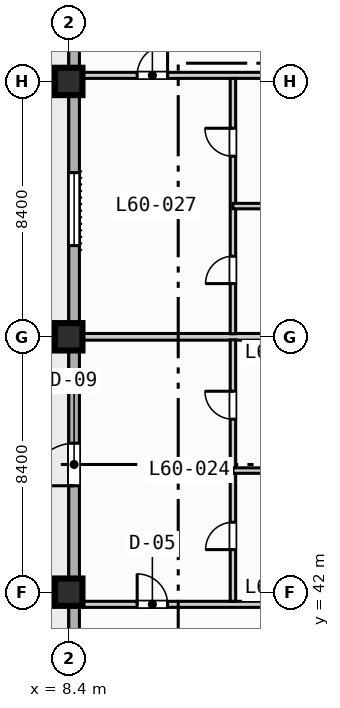
"""IFC4 building model, lengths in metres.
Left out: names, types, materials, properties, quantities, classifications, styles, units other than length and angle.
Written with IfcOpenShell. Run it as: python <this file> out.ifc"""

import sys

from ifc_helpers import new_model, si_unit, direction, frame, frame_2d, origin, origin_2d, place, context, subcontext, project, spatial, rectangle, extrude, element, fill, save


model = new_model("IFC4")
c1 = context("Model", 3, precision=1e-05, world=origin(), true_north=direction((0.0, 1.0)))
c2 = subcontext(c1, "Body", "Model", "MODEL_VIEW")
j1 = project(units=[si_unit("LENGTHUNIT", "METRE"), si_unit("PLANEANGLEUNIT", "RADIAN")], contexts=[c1])
p1 = place(None, origin())
s1 = spatial("IfcSite", under=j1, at=p1, CompositionType="ELEMENT")
p2 = place(p1, origin())
s2 = spatial("IfcBuilding", under=s1, at=p2, CompositionType="ELEMENT")
p3 = place(p2, frame((0.0, 0.0, 245.3)))
s3 = spatial("IfcBuildingStorey", under=s2, at=p3, CompositionType="ELEMENT", Elevation=245.3)
for number, where, z_axis, x_axis in (
    (1, (8.4, 42.0, 0.0), (0.0, 0.0, 1.0), (1.0, 0.0, 0.0)),
    (2, (8.4, 50.4, 0.0), (0.0, 0.0, 1.0), (1.0, 0.0, 0.0)),
    (3, (8.4, 58.8, 0.0), (0.0, 0.0, 1.0), (1.0, 0.0, 0.0)),
):
    element("IfcColumn", number, at=place(p3, frame(where, z_axis=z_axis, x_axis=x_axis)), inside=s3, PredefinedType="COLUMN", context=c2, shape_type="SweptSolid", body=[
        extrude(rectangle(XDim=0.9, YDim=0.9, at=origin_2d()), origin(), (0.0, 0.0, 1.0), 3.7),
    ])
p4 = place(p3, frame((8.575, 11.575, 0.0), z_axis=(0.0, 0.0, 1.0), x_axis=(0.0, 1.0, 0.0)))
e4 = element("IfcWall", 4, at=p4, inside=s3, PredefinedType="STANDARD", context=c2, shape_type="SweptSolid", body=[
    extrude(rectangle(XDim=60.85, YDim=0.35, at=frame_2d((30.425, 0.0))), origin(), (0.0, 0.0, 1.0), 3.47),
])
p5 = place(p4, frame((33.925, 0.0, 0.0)))
e5 = element("IfcOpeningElement", 5, at=p5, cuts=e4, PredefinedType="OPENING", context=c2, shape_type="SweptSolid", body=[
    extrude(rectangle(XDim=1.4, YDim=2.2, at=frame_2d((0.7, 1.1))), frame((0.0, 0.185, 0.0), z_axis=(0.0, -1.0, 0.0), x_axis=(1.0, 0.0, 0.0)), (0.0, 0.0, 1.0), 0.37),
])
p6 = place(p4, frame((25.025, 0.0, 0.85)))
e6 = element("IfcOpeningElement", 6, at=p6, cuts=e4, PredefinedType="OPENING", context=c2, shape_type="SweptSolid", body=[
    extrude(rectangle(XDim=2.4, YDim=1.95, at=frame_2d((1.2, 0.975))), frame((0.0, 0.185, 0.0), z_axis=(0.0, -1.0, 0.0), x_axis=(1.0, 0.0, 0.0)), (0.0, 0.0, 1.0), 0.37),
])
p7 = place(p4, frame((41.825, 0.0, 0.85)))
e7 = element("IfcOpeningElement", 7, at=p7, cuts=e4, PredefinedType="OPENING", context=c2, shape_type="SweptSolid", body=[
    extrude(rectangle(XDim=2.4, YDim=1.95, at=frame_2d((1.2, 0.975))), frame((0.0, 0.185, 0.0), z_axis=(0.0, -1.0, 0.0), x_axis=(1.0, 0.0, 0.0)), (0.0, 0.0, 1.0), 0.37),
])
p8 = place(p4, frame((19.25, 0.0, 0.85)))
e8 = element("IfcOpeningElement", 8, at=p8, cuts=e4, PredefinedType="OPENING", context=c2, shape_type="SweptSolid", body=[
    extrude(rectangle(XDim=1.8, YDim=1.8, at=frame_2d((0.9, 0.9))), frame((0.0, 0.185, 0.0), z_axis=(0.0, -1.0, 0.0), x_axis=(1.0, 0.0, 0.0)), (0.0, 0.0, 1.0), 0.37),
])
p9 = place(p3, frame((8.65, 41.6, 0.0), z_axis=(0.0, 0.0, 1.0), x_axis=(1.0, 0.0, 0.0)))
e9 = element("IfcWall", 9, at=p9, inside=s3, PredefinedType="PARTITIONING", context=c2, shape_type="SweptSolid", body=[
    extrude(rectangle(XDim=7.95, YDim=0.2, at=frame_2d((3.975, 0.0))), origin(), (0.0, 0.0, 1.0), 3.47),
])
p10 = place(p9, frame((2.0, 0.0, 0.0)))
e10 = element("IfcOpeningElement", 10, at=p10, cuts=e9, PredefinedType="OPENING", context=c2, shape_type="SweptSolid", body=[
    extrude(rectangle(XDim=1.0, YDim=2.15, at=frame_2d((0.5, 1.075))), frame((0.0, 0.11, 0.0), z_axis=(0.0, -1.0, 0.0), x_axis=(1.0, 0.0, 0.0)), (0.0, 0.0, 1.0), 0.22),
])
p11 = place(p3, frame((8.65, 59.0, 0.0), z_axis=(0.0, 0.0, 1.0), x_axis=(1.0, 0.0, 0.0)))
e11 = element("IfcWall", 11, at=p11, inside=s3, PredefinedType="PARTITIONING", context=c2, shape_type="SweptSolid", body=[
    extrude(rectangle(XDim=7.95, YDim=0.2, at=frame_2d((3.975, 0.0))), origin(), (0.0, 0.0, 1.0), 2.82),
])
p12 = place(p11, frame((2.0, 0.0, 0.0)))
e12 = element("IfcOpeningElement", 12, at=p12, cuts=e11, PredefinedType="OPENING", context=c2, shape_type="SweptSolid", body=[
    extrude(rectangle(XDim=1.0, YDim=2.15, at=frame_2d((0.5, 1.075))), frame((0.0, 0.11, 0.0), z_axis=(0.0, -1.0, 0.0), x_axis=(1.0, 0.0, 0.0)), (0.0, 0.0, 1.0), 0.22),
])
p13 = place(p3, frame((8.65, 50.4, 0.0), z_axis=(0.0, 0.0, 1.0), x_axis=(1.0, 0.0, 0.0)))
e13 = element("IfcWall", 13, at=p13, inside=s3, PredefinedType="PARTITIONING", context=c2, shape_type="SweptSolid", body=[
    extrude(rectangle(XDim=7.95, YDim=0.22, at=frame_2d((3.975, 0.0))), origin(), (0.0, 0.0, 1.0), 2.859),
])
p14 = place(p3, frame((13.8, 41.7, 0.0), z_axis=(0.0, 0.0, 1.0), x_axis=(0.0, 1.0, 0.0)))
e14 = element("IfcWall", 14, at=p14, inside=s3, PredefinedType="PLUMBINGWALL", context=c2, shape_type="SweptSolid", body=[
    extrude(rectangle(XDim=8.6, YDim=0.18, at=frame_2d((4.3, 0.0))), origin(), (0.0, 0.0, 1.0), 3.47),
])
p15 = place(p14, frame((1.7, 0.0, 0.0)))
e15 = element("IfcOpeningElement", 15, at=p15, cuts=e14, PredefinedType="OPENING", context=c2, shape_type="SweptSolid", body=[
    extrude(rectangle(XDim=0.9, YDim=2.1, at=frame_2d((0.45, 1.05))), frame((0.0, 0.1, 0.0), z_axis=(0.0, -1.0, 0.0), x_axis=(1.0, 0.0, 0.0)), (0.0, 0.0, 1.0), 0.2),
])
p16 = place(p14, frame((5.99, 0.0, 0.0)))
e16 = element("IfcOpeningElement", 16, at=p16, cuts=e14, PredefinedType="OPENING", context=c2, shape_type="SweptSolid", body=[
    extrude(rectangle(XDim=0.92, YDim=2.1, at=frame_2d((0.46, 1.05))), frame((0.0, 0.1, 0.0), z_axis=(0.0, -1.0, 0.0), x_axis=(1.0, 0.0, 0.0)), (0.0, 0.0, 1.0), 0.2),
])
p17 = place(p3, frame((13.8, 46.0, 0.0), z_axis=(0.0, 0.0, 1.0), x_axis=(1.0, 0.0, 0.0)))
e17 = element("IfcWall", 17, at=p17, inside=s3, PredefinedType="PLUMBINGWALL", context=c2, shape_type="SweptSolid", body=[
    extrude(rectangle(XDim=2.8, YDim=0.18, at=frame_2d((1.4, 0.0))), origin(), (0.0, 0.0, 1.0), 3.47),
])
p18 = place(p3, frame((13.8, 50.5, 0.0), z_axis=(0.0, 0.0, 1.0), x_axis=(0.0, 1.0, 0.0)))
e18 = element("IfcWall", 18, at=p18, inside=s3, PredefinedType="PLUMBINGWALL", context=c2, shape_type="SweptSolid", body=[
    extrude(rectangle(XDim=8.4, YDim=0.18, at=frame_2d((4.2, 0.0))), origin(), (0.0, 0.0, 1.0), 3.47),
])
p19 = place(p18, frame((1.65, 0.0, 0.0)))
e19 = element("IfcOpeningElement", 19, at=p19, cuts=e18, PredefinedType="OPENING", context=c2, shape_type="SweptSolid", body=[
    extrude(rectangle(XDim=0.9, YDim=2.1, at=frame_2d((0.45, 1.05))), frame((0.0, 0.1, 0.0), z_axis=(0.0, -1.0, 0.0), x_axis=(1.0, 0.0, 0.0)), (0.0, 0.0, 1.0), 0.2),
])
p20 = place(p18, frame((5.84, 0.0, 0.0)))
e20 = element("IfcOpeningElement", 20, at=p20, cuts=e18, PredefinedType="OPENING", context=c2, shape_type="SweptSolid", body=[
    extrude(rectangle(XDim=0.92, YDim=2.1, at=frame_2d((0.46, 1.05))), frame((0.0, 0.1, 0.0), z_axis=(0.0, -1.0, 0.0), x_axis=(1.0, 0.0, 0.0)), (0.0, 0.0, 1.0), 0.2),
])
p21 = place(p3, frame((13.8, 54.7, 0.0), z_axis=(0.0, 0.0, 1.0), x_axis=(1.0, 0.0, 0.0)))
e21 = element("IfcWall", 21, at=p21, inside=s3, PredefinedType="PLUMBINGWALL", context=c2, shape_type="SweptSolid", body=[
    extrude(rectangle(XDim=2.8, YDim=0.18, at=frame_2d((1.4, 0.0))), origin(), (0.0, 0.0, 1.0), 3.47),
])
p22 = place(p5, origin())
e22 = element("IfcDoor", 22, at=p22, inside=s3, OperationType="SINGLE_SWING_LEFT", PredefinedType="DOOR", context=c2, shape_type="SweptSolid", body=[
    extrude(rectangle(XDim=1.4, YDim=2.2, at=frame_2d((0.7, 1.1))), frame((0.0, 0.025, 0.0), z_axis=(0.0, -1.0, 0.0), x_axis=(1.0, 0.0, 0.0)), (0.0, 0.0, 1.0), 0.05),
])
fill(e5, e22)
p23 = place(p7, origin())
e23 = element("IfcWindow", 23, at=p23, inside=s3, PartitioningType="SINGLE_PANEL", PredefinedType="WINDOW", context=c2, shape_type="SweptSolid", body=[
    extrude(rectangle(XDim=2.4, YDim=1.95, at=frame_2d((1.2, 0.975))), frame((0.0, 0.03, 0.0), z_axis=(0.0, -1.0, 0.0), x_axis=(1.0, 0.0, 0.0)), (0.0, 0.0, 1.0), 0.06),
])
fill(e7, e23)
p24 = place(p10, origin())
e24 = element("IfcDoor", 24, at=p24, inside=s3, OperationType="SINGLE_SWING_LEFT", PredefinedType="DOOR", context=c2, shape_type="SweptSolid", body=[
    extrude(rectangle(XDim=1.0, YDim=2.15, at=frame_2d((0.5, 1.075))), frame((0.0, 0.025, 0.0), z_axis=(0.0, -1.0, 0.0), x_axis=(1.0, 0.0, 0.0)), (0.0, 0.0, 1.0), 0.05),
])
fill(e10, e24)
p25 = place(p12, origin())
e25 = element("IfcDoor", 25, at=p25, inside=s3, OperationType="SINGLE_SWING_RIGHT", PredefinedType="DOOR", context=c2, shape_type="SweptSolid", body=[
    extrude(rectangle(XDim=1.0, YDim=2.15, at=frame_2d((0.5, 1.075))), frame((0.0, 0.025, 0.0), z_axis=(0.0, -1.0, 0.0), x_axis=(1.0, 0.0, 0.0)), (0.0, 0.0, 1.0), 0.05),
])
fill(e12, e25)
p26 = place(p15, origin())
e26 = element("IfcDoor", 26, at=p26, inside=s3, OperationType="SINGLE_SWING_LEFT", PredefinedType="DOOR", context=c2, shape_type="SweptSolid", body=[
    extrude(rectangle(XDim=0.9, YDim=2.1, at=frame_2d((0.45, 1.05))), frame((0.0, 0.025, 0.0), z_axis=(0.0, -1.0, 0.0), x_axis=(1.0, 0.0, 0.0)), (0.0, 0.0, 1.0), 0.05),
])
fill(e15, e26)
p27 = place(p16, origin())
e27 = element("IfcDoor", 27, at=p27, inside=s3, OperationType="SINGLE_SWING_RIGHT", PredefinedType="DOOR", context=c2, shape_type="SweptSolid", body=[
    extrude(rectangle(XDim=0.92, YDim=2.1, at=frame_2d((0.46, 1.05))), frame((0.0, 0.025, 0.0), z_axis=(0.0, -1.0, 0.0), x_axis=(1.0, 0.0, 0.0)), (0.0, 0.0, 1.0), 0.05),
])
fill(e16, e27)
p28 = place(p19, origin())
e28 = element("IfcDoor", 28, at=p28, inside=s3, OperationType="SINGLE_SWING_LEFT", PredefinedType="DOOR", context=c2, shape_type="SweptSolid", body=[
    extrude(rectangle(XDim=0.9, YDim=2.1, at=frame_2d((0.45, 1.05))), frame((0.0, 0.025, 0.0), z_axis=(0.0, -1.0, 0.0), x_axis=(1.0, 0.0, 0.0)), (0.0, 0.0, 1.0), 0.05),
])
fill(e19, e28)
p29 = place(p20, origin())
e29 = element("IfcDoor", 29, at=p29, inside=s3, OperationType="SINGLE_SWING_RIGHT", PredefinedType="DOOR", context=c2, shape_type="SweptSolid", body=[
    extrude(rectangle(XDim=0.92, YDim=2.1, at=frame_2d((0.46, 1.05))), frame((0.0, 0.025, 0.0), z_axis=(0.0, -1.0, 0.0), x_axis=(1.0, 0.0, 0.0)), (0.0, 0.0, 1.0), 0.05),
])
fill(e20, e29)
save(model, sys.argv[1])
